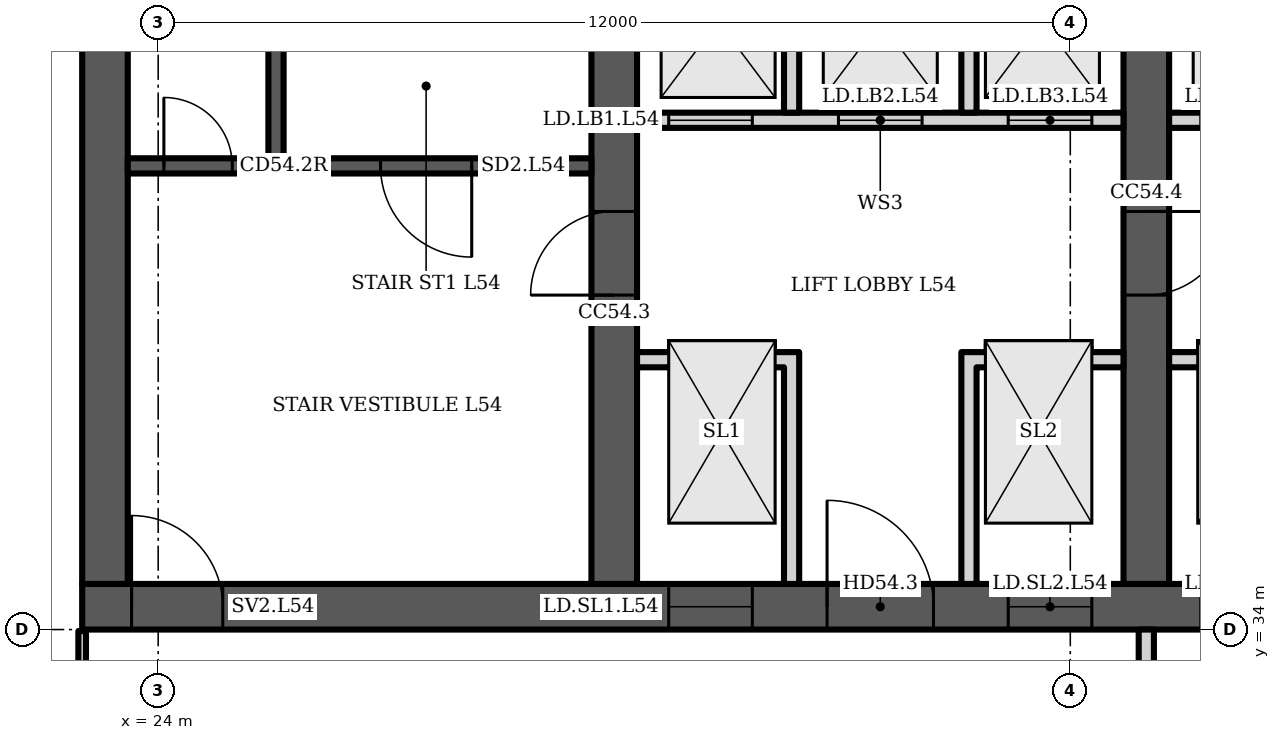
"""IFC4 building model, lengths in metres.
Left out: names, types, materials, properties, quantities, classifications, styles, units other than length and angle.
Written with IfcOpenShell. Run it as: python <this file> out.ifc"""

import sys

from ifc_helpers import new_model, si_unit, direction, frame, frame_2d, origin, place, context, subcontext, project, spatial, polyline, rectangle, outline, extrude, element, fill, save


model = new_model("IFC4")
c1 = context("Model", 3, precision=1e-05, world=origin(), true_north=direction((0.0, 1.0)))
c2 = subcontext(c1, "Body", "Model", "MODEL_VIEW")
j1 = project(units=[si_unit("LENGTHUNIT", "METRE"), si_unit("PLANEANGLEUNIT", "RADIAN")], contexts=[c1])
p1 = place(None, origin())
s1 = spatial("IfcSite", under=j1, at=p1, CompositionType="ELEMENT")
p2 = place(p1, origin())
s2 = spatial("IfcBuilding", under=s1, at=p2, CompositionType="ELEMENT")
p3 = place(p2, frame((0.0, 0.0, 217.9)))
s3 = spatial("IfcBuildingStorey", under=s2, at=p3, CompositionType="ELEMENT", Elevation=217.9)
p4 = place(p3, frame((23.0, 34.3, 0.0), z_axis=(0.0, 0.0, 1.0), x_axis=(1.0, 0.0, 0.0)))
e1 = element("IfcWall", 1, at=p4, inside=s3, PredefinedType="SHEAR", context=c2, shape_type="SweptSolid", body=[
    extrude(rectangle(XDim=35.0, YDim=0.6, at=frame_2d((17.5, 0.0))), origin(), (0.0, 0.0, 1.0), 3.6),
])
p5 = place(p4, frame((0.65, 0.0, 0.0)))
e2 = element("IfcOpeningElement", 2, at=p5, cuts=e1, PredefinedType="OPENING", context=c2, shape_type="SweptSolid", body=[
    extrude(rectangle(XDim=1.2, YDim=2.1, at=frame_2d((0.6, 1.05))), frame((0.0, 0.31, 0.0), z_axis=(0.0, -1.0, 0.0), x_axis=(1.0, 0.0, 0.0)), (0.0, 0.0, 1.0), 0.62),
])
p6 = place(p4, frame((7.717, 0.0, 0.0)))
e3 = element("IfcOpeningElement", 3, at=p6, cuts=e1, PredefinedType="OPENING", context=c2, shape_type="SweptSolid", body=[
    extrude(rectangle(XDim=1.1, YDim=2.1, at=frame_2d((0.55, 1.05))), frame((0.0, 0.31, 0.0), z_axis=(0.0, -1.0, 0.0), x_axis=(1.0, 0.0, 0.0)), (0.0, 0.0, 1.0), 0.62),
])
p7 = place(p4, frame((12.183, 0.0, 0.0)))
e4 = element("IfcOpeningElement", 4, at=p7, cuts=e1, PredefinedType="OPENING", context=c2, shape_type="SweptSolid", body=[
    extrude(rectangle(XDim=1.1, YDim=2.1, at=frame_2d((0.55, 1.05))), frame((0.0, 0.31, 0.0), z_axis=(0.0, -1.0, 0.0), x_axis=(1.0, 0.0, 0.0)), (0.0, 0.0, 1.0), 0.62),
])
p8 = place(p4, frame((9.8, 0.0, 0.0)))
e5 = element("IfcOpeningElement", 5, at=p8, cuts=e1, PredefinedType="OPENING", context=c2, shape_type="SweptSolid", body=[
    extrude(rectangle(XDim=1.4, YDim=2.1, at=frame_2d((0.7, 1.05))), frame((0.0, 0.31, 0.0), z_axis=(0.0, -1.0, 0.0), x_axis=(1.0, 0.0, 0.0)), (0.0, 0.0, 1.0), 0.62),
])
p9 = place(p4, frame((14.717, 0.0, 0.0)))
e6 = element("IfcOpeningElement", 6, at=p9, cuts=e1, PredefinedType="OPENING", context=c2, shape_type="SweptSolid", body=[
    extrude(rectangle(XDim=1.1, YDim=2.1, at=frame_2d((0.55, 1.05))), frame((0.0, 0.31, 0.0), z_axis=(0.0, -1.0, 0.0), x_axis=(1.0, 0.0, 0.0)), (0.0, 0.0, 1.0), 0.62),
])
p10 = place(p4, frame((16.95, 0.0, 0.0)))
e7 = element("IfcOpeningElement", 7, at=p10, cuts=e1, PredefinedType="OPENING", context=c2, shape_type="SweptSolid", body=[
    extrude(rectangle(XDim=1.1, YDim=2.1, at=frame_2d((0.55, 1.05))), frame((0.0, 0.31, 0.0), z_axis=(0.0, -1.0, 0.0), x_axis=(1.0, 0.0, 0.0)), (0.0, 0.0, 1.0), 0.62),
])
p11 = place(p4, frame((19.183, 0.0, 0.0)))
e8 = element("IfcOpeningElement", 8, at=p11, cuts=e1, PredefinedType="OPENING", context=c2, shape_type="SweptSolid", body=[
    extrude(rectangle(XDim=1.1, YDim=2.1, at=frame_2d((0.55, 1.05))), frame((0.0, 0.31, 0.0), z_axis=(0.0, -1.0, 0.0), x_axis=(1.0, 0.0, 0.0)), (0.0, 0.0, 1.0), 0.62),
])
p12 = place(p4, frame((26.15, 0.0, 0.0)))
e9 = element("IfcOpeningElement", 9, at=p12, cuts=e1, PredefinedType="OPENING", context=c2, shape_type="SweptSolid", body=[
    extrude(rectangle(XDim=1.2, YDim=2.1, at=frame_2d((0.6, 1.05))), frame((0.0, 0.31, 0.0), z_axis=(0.0, -1.0, 0.0), x_axis=(1.0, 0.0, 0.0)), (0.0, 0.0, 1.0), 0.62),
])
p13 = place(p4, frame((28.767, 0.0, 0.0)))
e10 = element("IfcOpeningElement", 10, at=p13, cuts=e1, PredefinedType="OPENING", context=c2, shape_type="SweptSolid", body=[
    extrude(rectangle(XDim=1.0, YDim=2.1, at=frame_2d((0.5, 1.05))), frame((0.0, 0.31, 0.0), z_axis=(0.0, -1.0, 0.0), x_axis=(1.0, 0.0, 0.0)), (0.0, 0.0, 1.0), 0.62),
])
p14 = place(p4, frame((33.083, 0.0, 0.0)))
e11 = element("IfcOpeningElement", 11, at=p14, cuts=e1, PredefinedType="OPENING", context=c2, shape_type="SweptSolid", body=[
    extrude(rectangle(XDim=1.0, YDim=2.1, at=frame_2d((0.5, 1.05))), frame((0.0, 0.31, 0.0), z_axis=(0.0, -1.0, 0.0), x_axis=(1.0, 0.0, 0.0)), (0.0, 0.0, 1.0), 0.62),
])
p15 = place(p4, frame((30.8, 0.0, 0.0)))
e12 = element("IfcOpeningElement", 12, at=p15, cuts=e1, PredefinedType="OPENING", context=c2, shape_type="SweptSolid", body=[
    extrude(rectangle(XDim=1.4, YDim=2.1, at=frame_2d((0.7, 1.05))), frame((0.0, 0.31, 0.0), z_axis=(0.0, -1.0, 0.0), x_axis=(1.0, 0.0, 0.0)), (0.0, 0.0, 1.0), 0.62),
])
p16 = place(p3, frame((23.3, 34.6, 0.0), z_axis=(0.0, 0.0, 1.0), x_axis=(0.0, 1.0, 0.0)))
e13 = element("IfcWall", 13, at=p16, inside=s3, PredefinedType="SHEAR", context=c2, shape_type="SweptSolid", body=[
    extrude(rectangle(XDim=13.585, YDim=0.6, at=frame_2d((6.792, 0.0))), origin(), (0.0, 0.0, 1.0), 3.6),
])
p17 = place(p3, frame((30.0, 34.6, 0.0), z_axis=(0.0, 0.0, 1.0), x_axis=(0.0, 1.0, 0.0)))
e14 = element("IfcWall", 14, at=p17, inside=s3, PredefinedType="SHEAR", context=c2, shape_type="SweptSolid", body=[
    extrude(rectangle(XDim=14.171, YDim=0.6, at=frame_2d((7.085, 0.0))), origin(), (0.0, 0.0, 1.0), 3.6),
])
p18 = place(p17, frame((3.8, 0.0, 0.0)))
e15 = element("IfcOpeningElement", 15, at=p18, cuts=e14, PredefinedType="OPENING", context=c2, shape_type="SweptSolid", body=[
    extrude(rectangle(XDim=1.1, YDim=2.1, at=frame_2d((0.55, 1.05))), frame((0.0, 0.31, 0.0), z_axis=(0.0, -1.0, 0.0), x_axis=(1.0, 0.0, 0.0)), (0.0, 0.0, 1.0), 0.62),
])
p19 = place(p3, frame((37.0, 34.6, 0.0), z_axis=(0.0, 0.0, 1.0), x_axis=(0.0, 1.0, 0.0)))
e16 = element("IfcWall", 16, at=p19, inside=s3, PredefinedType="SHEAR", context=c2, shape_type="SweptSolid", body=[
    extrude(rectangle(XDim=14.784, YDim=0.6, at=frame_2d((7.392, 0.0))), origin(), (0.0, 0.0, 1.0), 3.6),
])
p20 = place(p19, frame((11.302, 0.0, 0.0)))
e17 = element("IfcOpeningElement", 17, at=p20, cuts=e16, PredefinedType="OPENING", context=c2, shape_type="SweptSolid", body=[
    extrude(rectangle(XDim=1.0, YDim=2.1, at=frame_2d((0.5, 1.05))), frame((0.0, 0.31, 0.0), z_axis=(0.0, -1.0, 0.0), x_axis=(1.0, 0.0, 0.0)), (0.0, 0.0, 1.0), 0.62),
])
p21 = place(p19, frame((3.8, 0.0, 0.0)))
e18 = element("IfcOpeningElement", 18, at=p21, cuts=e16, PredefinedType="OPENING", context=c2, shape_type="SweptSolid", body=[
    extrude(rectangle(XDim=1.1, YDim=2.1, at=frame_2d((0.55, 1.05))), frame((0.0, 0.31, 0.0), z_axis=(0.0, -1.0, 0.0), x_axis=(1.0, 0.0, 0.0)), (0.0, 0.0, 1.0), 0.62),
])
p22 = place(p3, frame((23.6, 40.1, 0.0), z_axis=(0.0, 0.0, 1.0), x_axis=(1.0, 0.0, 0.0)))
e19 = element("IfcWall", 19, at=p22, inside=s3, PredefinedType="SHEAR", context=c2, shape_type="SweptSolid", body=[
    extrude(rectangle(XDim=6.1, YDim=0.2, at=frame_2d((3.05, 0.0))), origin(), (0.0, 0.0, 1.0), 3.2),
])
p23 = place(p22, frame((3.325, 0.0, 0.0)))
e20 = element("IfcOpeningElement", 20, at=p23, cuts=e19, PredefinedType="OPENING", context=c2, shape_type="SweptSolid", body=[
    extrude(rectangle(XDim=1.2, YDim=2.1, at=frame_2d((0.6, 1.05))), frame((0.0, 0.11, 0.0), z_axis=(0.0, -1.0, 0.0), x_axis=(1.0, 0.0, 0.0)), (0.0, 0.0, 1.0), 0.22),
])
p24 = place(p22, frame((0.475, 0.0, 0.0)))
e21 = element("IfcOpeningElement", 21, at=p24, cuts=e19, PredefinedType="OPENING", context=c2, shape_type="SweptSolid", body=[
    extrude(rectangle(XDim=0.9, YDim=2.1, at=frame_2d((0.45, 1.05))), frame((0.0, 0.11, 0.0), z_axis=(0.0, -1.0, 0.0), x_axis=(1.0, 0.0, 0.0)), (0.0, 0.0, 1.0), 0.22),
])
p25 = place(p3, frame((25.55, 40.2, 0.0), z_axis=(0.0, 0.0, 1.0), x_axis=(0.0, 1.0, 0.0)))
e22 = element("IfcWall", 22, at=p25, inside=s3, PredefinedType="SHEAR", context=c2, shape_type="SweptSolid", body=[
    extrude(rectangle(XDim=7.2, YDim=0.2, at=frame_2d((3.6, 0.0))), origin(), (0.0, 0.0, 1.0), 3.2),
])
p26 = place(p3, frame((30.3, 40.7, 0.0), z_axis=(0.0, 0.0, 1.0), x_axis=(1.0, 0.0, 0.0)))
e23 = element("IfcWall", 23, at=p26, inside=s3, PredefinedType="PARTITIONING", context=c2, shape_type="SweptSolid", body=[
    extrude(rectangle(XDim=6.4, YDim=0.2, at=frame_2d((3.2, 0.0))), origin(), (0.0, 0.0, 1.0), 3.2),
])
p27 = place(p26, frame((0.417, 0.0, 0.0)))
e24 = element("IfcOpeningElement", 24, at=p27, cuts=e23, PredefinedType="OPENING", context=c2, shape_type="SweptSolid", body=[
    extrude(rectangle(XDim=1.1, YDim=2.1, at=frame_2d((0.55, 1.05))), frame((0.0, 0.11, 0.0), z_axis=(0.0, -1.0, 0.0), x_axis=(1.0, 0.0, 0.0)), (0.0, 0.0, 1.0), 0.22),
])
p28 = place(p26, frame((2.65, 0.0, 0.0)))
e25 = element("IfcOpeningElement", 25, at=p28, cuts=e23, PredefinedType="OPENING", context=c2, shape_type="SweptSolid", body=[
    extrude(rectangle(XDim=1.1, YDim=2.1, at=frame_2d((0.55, 1.05))), frame((0.0, 0.11, 0.0), z_axis=(0.0, -1.0, 0.0), x_axis=(1.0, 0.0, 0.0)), (0.0, 0.0, 1.0), 0.22),
])
p29 = place(p26, frame((4.883, 0.0, 0.0)))
e26 = element("IfcOpeningElement", 26, at=p29, cuts=e23, PredefinedType="OPENING", context=c2, shape_type="SweptSolid", body=[
    extrude(rectangle(XDim=1.1, YDim=2.1, at=frame_2d((0.55, 1.05))), frame((0.0, 0.11, 0.0), z_axis=(0.0, -1.0, 0.0), x_axis=(1.0, 0.0, 0.0)), (0.0, 0.0, 1.0), 0.22),
])
p30 = place(p3, origin())
e27 = element("IfcWall", 27, at=p30, inside=s3, PredefinedType="PARTITIONING", context=c2, shape_type="SweptSolid", body=[
    extrude(outline(polyline([(32.233, 37.45), (30.3, 37.45), (30.3, 37.65), (32.233, 37.65), (32.433, 37.65), (32.433, 34.6), (32.233, 34.6), (32.233, 37.45)])), origin(), (0.0, 0.0, 1.0), 3.2),
])
p31 = place(p3, origin())
e28 = element("IfcWall", 28, at=p31, inside=s3, PredefinedType="PARTITIONING", context=c2, shape_type="SweptSolid", body=[
    extrude(outline(polyline([(34.567, 37.65), (34.767, 37.65), (36.7, 37.65), (36.7, 37.45), (34.767, 37.45), (34.767, 34.6), (34.567, 34.6), (34.567, 37.65)])), origin(), (0.0, 0.0, 1.0), 3.2),
])
p32 = place(p3, origin())
e29 = element("IfcWall", 29, at=p32, inside=s3, PredefinedType="PARTITIONING", context=c2, shape_type="SweptSolid", body=[
    extrude(outline(polyline([(32.433, 40.8), (32.233, 40.8), (32.233, 43.8), (30.3, 43.8), (30.3, 44.0), (36.7, 44.0), (36.7, 43.8), (34.767, 43.8), (34.767, 40.8), (34.567, 40.8), (34.567, 43.8), (32.433, 43.8), (32.433, 40.8)])), origin(), (0.0, 0.0, 1.0), 3.2),
])
p33 = place(p3, frame((37.3, 40.7, 0.0), z_axis=(0.0, 0.0, 1.0), x_axis=(1.0, 0.0, 0.0)))
e30 = element("IfcWall", 30, at=p33, inside=s3, PredefinedType="PARTITIONING", context=c2, shape_type="SweptSolid", body=[
    extrude(rectangle(XDim=6.4, YDim=0.2, at=frame_2d((3.2, 0.0))), origin(), (0.0, 0.0, 1.0), 3.2),
])
p34 = place(p33, frame((0.417, 0.0, 0.0)))
e31 = element("IfcOpeningElement", 31, at=p34, cuts=e30, PredefinedType="OPENING", context=c2, shape_type="SweptSolid", body=[
    extrude(rectangle(XDim=1.1, YDim=2.1, at=frame_2d((0.55, 1.05))), frame((0.0, 0.11, 0.0), z_axis=(0.0, -1.0, 0.0), x_axis=(1.0, 0.0, 0.0)), (0.0, 0.0, 1.0), 0.22),
])
p35 = place(p33, frame((2.65, 0.0, 0.0)))
e32 = element("IfcOpeningElement", 32, at=p35, cuts=e30, PredefinedType="OPENING", context=c2, shape_type="SweptSolid", body=[
    extrude(rectangle(XDim=1.1, YDim=2.1, at=frame_2d((0.55, 1.05))), frame((0.0, 0.11, 0.0), z_axis=(0.0, -1.0, 0.0), x_axis=(1.0, 0.0, 0.0)), (0.0, 0.0, 1.0), 0.22),
])
p36 = place(p33, frame((4.883, 0.0, 0.0)))
e33 = element("IfcOpeningElement", 33, at=p36, cuts=e30, PredefinedType="OPENING", context=c2, shape_type="SweptSolid", body=[
    extrude(rectangle(XDim=1.1, YDim=2.1, at=frame_2d((0.55, 1.05))), frame((0.0, 0.11, 0.0), z_axis=(0.0, -1.0, 0.0), x_axis=(1.0, 0.0, 0.0)), (0.0, 0.0, 1.0), 0.22),
])
p37 = place(p3, origin())
e34 = element("IfcWall", 34, at=p37, inside=s3, PredefinedType="PARTITIONING", context=c2, shape_type="SweptSolid", body=[
    extrude(outline(polyline([(41.567, 37.1), (39.433, 37.1), (39.433, 34.6), (39.233, 34.6), (39.233, 37.45), (37.3, 37.45), (37.3, 37.65), (39.233, 37.65), (39.433, 37.65), (39.433, 37.3), (41.567, 37.3), (41.567, 37.35), (41.767, 37.35), (43.7, 37.35), (43.7, 37.15), (41.767, 37.15), (41.767, 34.6), (41.567, 34.6), (41.567, 37.1)])), origin(), (0.0, 0.0, 1.0), 3.2),
])
p38 = place(p3, origin())
e35 = element("IfcWall", 35, at=p38, inside=s3, PredefinedType="PARTITIONING", context=c2, shape_type="SweptSolid", body=[
    extrude(outline(polyline([(39.433, 40.8), (39.233, 40.8), (39.233, 43.8), (37.3, 43.8), (37.3, 44.0), (43.7, 44.0), (43.7, 43.8), (41.767, 43.8), (41.767, 40.8), (41.567, 40.8), (41.567, 43.8), (39.433, 43.8), (39.433, 40.8)])), origin(), (0.0, 0.0, 1.0), 3.2),
])
p39 = place(p3, frame((37.0, 30.5, 0.0), z_axis=(0.0, 0.0, 1.0), x_axis=(0.0, 1.0, 0.0)))
e36 = element("IfcWall", 36, at=p39, inside=s3, PredefinedType="PARTITIONING", context=c2, shape_type="SweptSolid", body=[
    extrude(rectangle(XDim=3.5, YDim=0.2, at=frame_2d((1.75, 0.0))), origin(), (0.0, 0.0, 1.0), 3.2),
])
p40 = place(p39, frame((1.2, 0.0, 0.0)))
e37 = element("IfcOpeningElement", 37, at=p40, cuts=e36, PredefinedType="OPENING", context=c2, shape_type="SweptSolid", body=[
    extrude(rectangle(XDim=1.1, YDim=2.1, at=frame_2d((0.55, 1.05))), frame((0.0, 0.11, 0.0), z_axis=(0.0, -1.0, 0.0), x_axis=(1.0, 0.0, 0.0)), (0.0, 0.0, 1.0), 0.22),
])
p41 = place(p3, frame((23.0, 30.5, 0.0), z_axis=(0.0, 0.0, 1.0), x_axis=(0.0, 1.0, 0.0)))
e38 = element("IfcWall", 38, at=p41, inside=s3, PredefinedType="PARTITIONING", context=c2, shape_type="SweptSolid", body=[
    extrude(rectangle(XDim=3.48, YDim=0.1, at=frame_2d((1.74, 0.0))), origin(), (0.0, 0.0, 1.0), 3.2),
])
p42 = place(p41, frame((0.28, 0.0, 0.0)))
e39 = element("IfcOpeningElement", 39, at=p42, cuts=e38, PredefinedType="OPENING", context=c2, shape_type="SweptSolid", body=[
    extrude(rectangle(XDim=1.0, YDim=2.1, at=frame_2d((0.5, 1.05))), frame((0.0, 0.06, 0.0), z_axis=(0.0, -1.0, 0.0), x_axis=(1.0, 0.0, 0.0)), (0.0, 0.0, 1.0), 0.12),
])
p43 = place(p23, origin())
e40 = element("IfcDoor", 40, at=p43, inside=s3, OperationType="SINGLE_SWING_RIGHT", PredefinedType="DOOR", context=c2, shape_type="SweptSolid", body=[
    extrude(rectangle(XDim=1.2, YDim=2.1, at=frame_2d((0.6, 1.05))), frame((0.0, 0.025, 0.0), z_axis=(0.0, -1.0, 0.0), x_axis=(1.0, 0.0, 0.0)), (0.0, 0.0, 1.0), 0.05),
])
fill(e20, e40)
p44 = place(p24, origin())
e41 = element("IfcDoor", 41, at=p44, inside=s3, OperationType="SINGLE_SWING_LEFT", PredefinedType="DOOR", context=c2, shape_type="SweptSolid", body=[
    extrude(rectangle(XDim=0.9, YDim=2.1, at=frame_2d((0.45, 1.05))), frame((0.0, 0.025, 0.0), z_axis=(0.0, -1.0, 0.0), x_axis=(1.0, 0.0, 0.0)), (0.0, 0.0, 1.0), 0.05),
])
fill(e21, e41)
p45 = place(p5, origin())
e42 = element("IfcDoor", 42, at=p45, inside=s3, OperationType="SINGLE_SWING_LEFT", PredefinedType="DOOR", context=c2, shape_type="SweptSolid", body=[
    extrude(rectangle(XDim=1.2, YDim=2.1, at=frame_2d((0.6, 1.05))), frame((0.0, 0.025, 0.0), z_axis=(0.0, -1.0, 0.0), x_axis=(1.0, 0.0, 0.0)), (0.0, 0.0, 1.0), 0.05),
])
fill(e2, e42)
p46 = place(p6, origin())
e43 = element("IfcDoor", 43, at=p46, inside=s3, OperationType="DOUBLE_DOOR_SLIDING", PredefinedType="DOOR", context=c2, shape_type="SweptSolid", body=[
    extrude(rectangle(XDim=1.1, YDim=2.1, at=frame_2d((0.55, 1.05))), frame((0.0, 0.025, 0.0), z_axis=(0.0, -1.0, 0.0), x_axis=(1.0, 0.0, 0.0)), (0.0, 0.0, 1.0), 0.05),
])
fill(e3, e43)
p47 = place(p7, origin())
e44 = element("IfcDoor", 44, at=p47, inside=s3, OperationType="DOUBLE_DOOR_SLIDING", PredefinedType="DOOR", context=c2, shape_type="SweptSolid", body=[
    extrude(rectangle(XDim=1.1, YDim=2.1, at=frame_2d((0.55, 1.05))), frame((0.0, 0.025, 0.0), z_axis=(0.0, -1.0, 0.0), x_axis=(1.0, 0.0, 0.0)), (0.0, 0.0, 1.0), 0.05),
])
fill(e4, e44)
p48 = place(p8, origin())
e45 = element("IfcDoor", 45, at=p48, inside=s3, OperationType="DOUBLE_DOOR_SINGLE_SWING", PredefinedType="DOOR", context=c2, shape_type="SweptSolid", body=[
    extrude(rectangle(XDim=1.4, YDim=2.1, at=frame_2d((0.7, 1.05))), frame((0.0, 0.025, 0.0), z_axis=(0.0, -1.0, 0.0), x_axis=(1.0, 0.0, 0.0)), (0.0, 0.0, 1.0), 0.05),
])
fill(e5, e45)
p49 = place(p27, origin())
e46 = element("IfcDoor", 46, at=p49, inside=s3, OperationType="DOUBLE_DOOR_SLIDING", PredefinedType="DOOR", context=c2, shape_type="SweptSolid", body=[
    extrude(rectangle(XDim=1.1, YDim=2.1, at=frame_2d((0.55, 1.05))), frame((0.0, 0.025, 0.0), z_axis=(0.0, -1.0, 0.0), x_axis=(1.0, 0.0, 0.0)), (0.0, 0.0, 1.0), 0.05),
])
fill(e24, e46)
p50 = place(p28, origin())
e47 = element("IfcDoor", 47, at=p50, inside=s3, OperationType="DOUBLE_DOOR_SLIDING", PredefinedType="DOOR", context=c2, shape_type="SweptSolid", body=[
    extrude(rectangle(XDim=1.1, YDim=2.1, at=frame_2d((0.55, 1.05))), frame((0.0, 0.025, 0.0), z_axis=(0.0, -1.0, 0.0), x_axis=(1.0, 0.0, 0.0)), (0.0, 0.0, 1.0), 0.05),
])
fill(e25, e47)
p51 = place(p29, origin())
e48 = element("IfcDoor", 48, at=p51, inside=s3, OperationType="DOUBLE_DOOR_SLIDING", PredefinedType="DOOR", context=c2, shape_type="SweptSolid", body=[
    extrude(rectangle(XDim=1.1, YDim=2.1, at=frame_2d((0.55, 1.05))), frame((0.0, 0.025, 0.0), z_axis=(0.0, -1.0, 0.0), x_axis=(1.0, 0.0, 0.0)), (0.0, 0.0, 1.0), 0.05),
])
fill(e26, e48)
p52 = place(p18, origin())
e49 = element("IfcDoor", 49, at=p52, inside=s3, OperationType="SINGLE_SWING_LEFT", PredefinedType="DOOR", context=c2, shape_type="SweptSolid", body=[
    extrude(rectangle(XDim=1.1, YDim=2.1, at=frame_2d((0.55, 1.05))), frame((0.0, 0.025, 0.0), z_axis=(0.0, -1.0, 0.0), x_axis=(1.0, 0.0, 0.0)), (0.0, 0.0, 1.0), 0.05),
])
fill(e15, e49)
p53 = place(p21, origin())
e50 = element("IfcDoor", 50, at=p53, inside=s3, OperationType="SINGLE_SWING_RIGHT", PredefinedType="DOOR", context=c2, shape_type="SweptSolid", body=[
    extrude(rectangle(XDim=1.1, YDim=2.1, at=frame_2d((0.55, 1.05))), frame((0.0, 0.025, 0.0), z_axis=(0.0, -1.0, 0.0), x_axis=(1.0, 0.0, 0.0)), (0.0, 0.0, 1.0), 0.05),
])
fill(e18, e50)
save(model, sys.argv[1])
